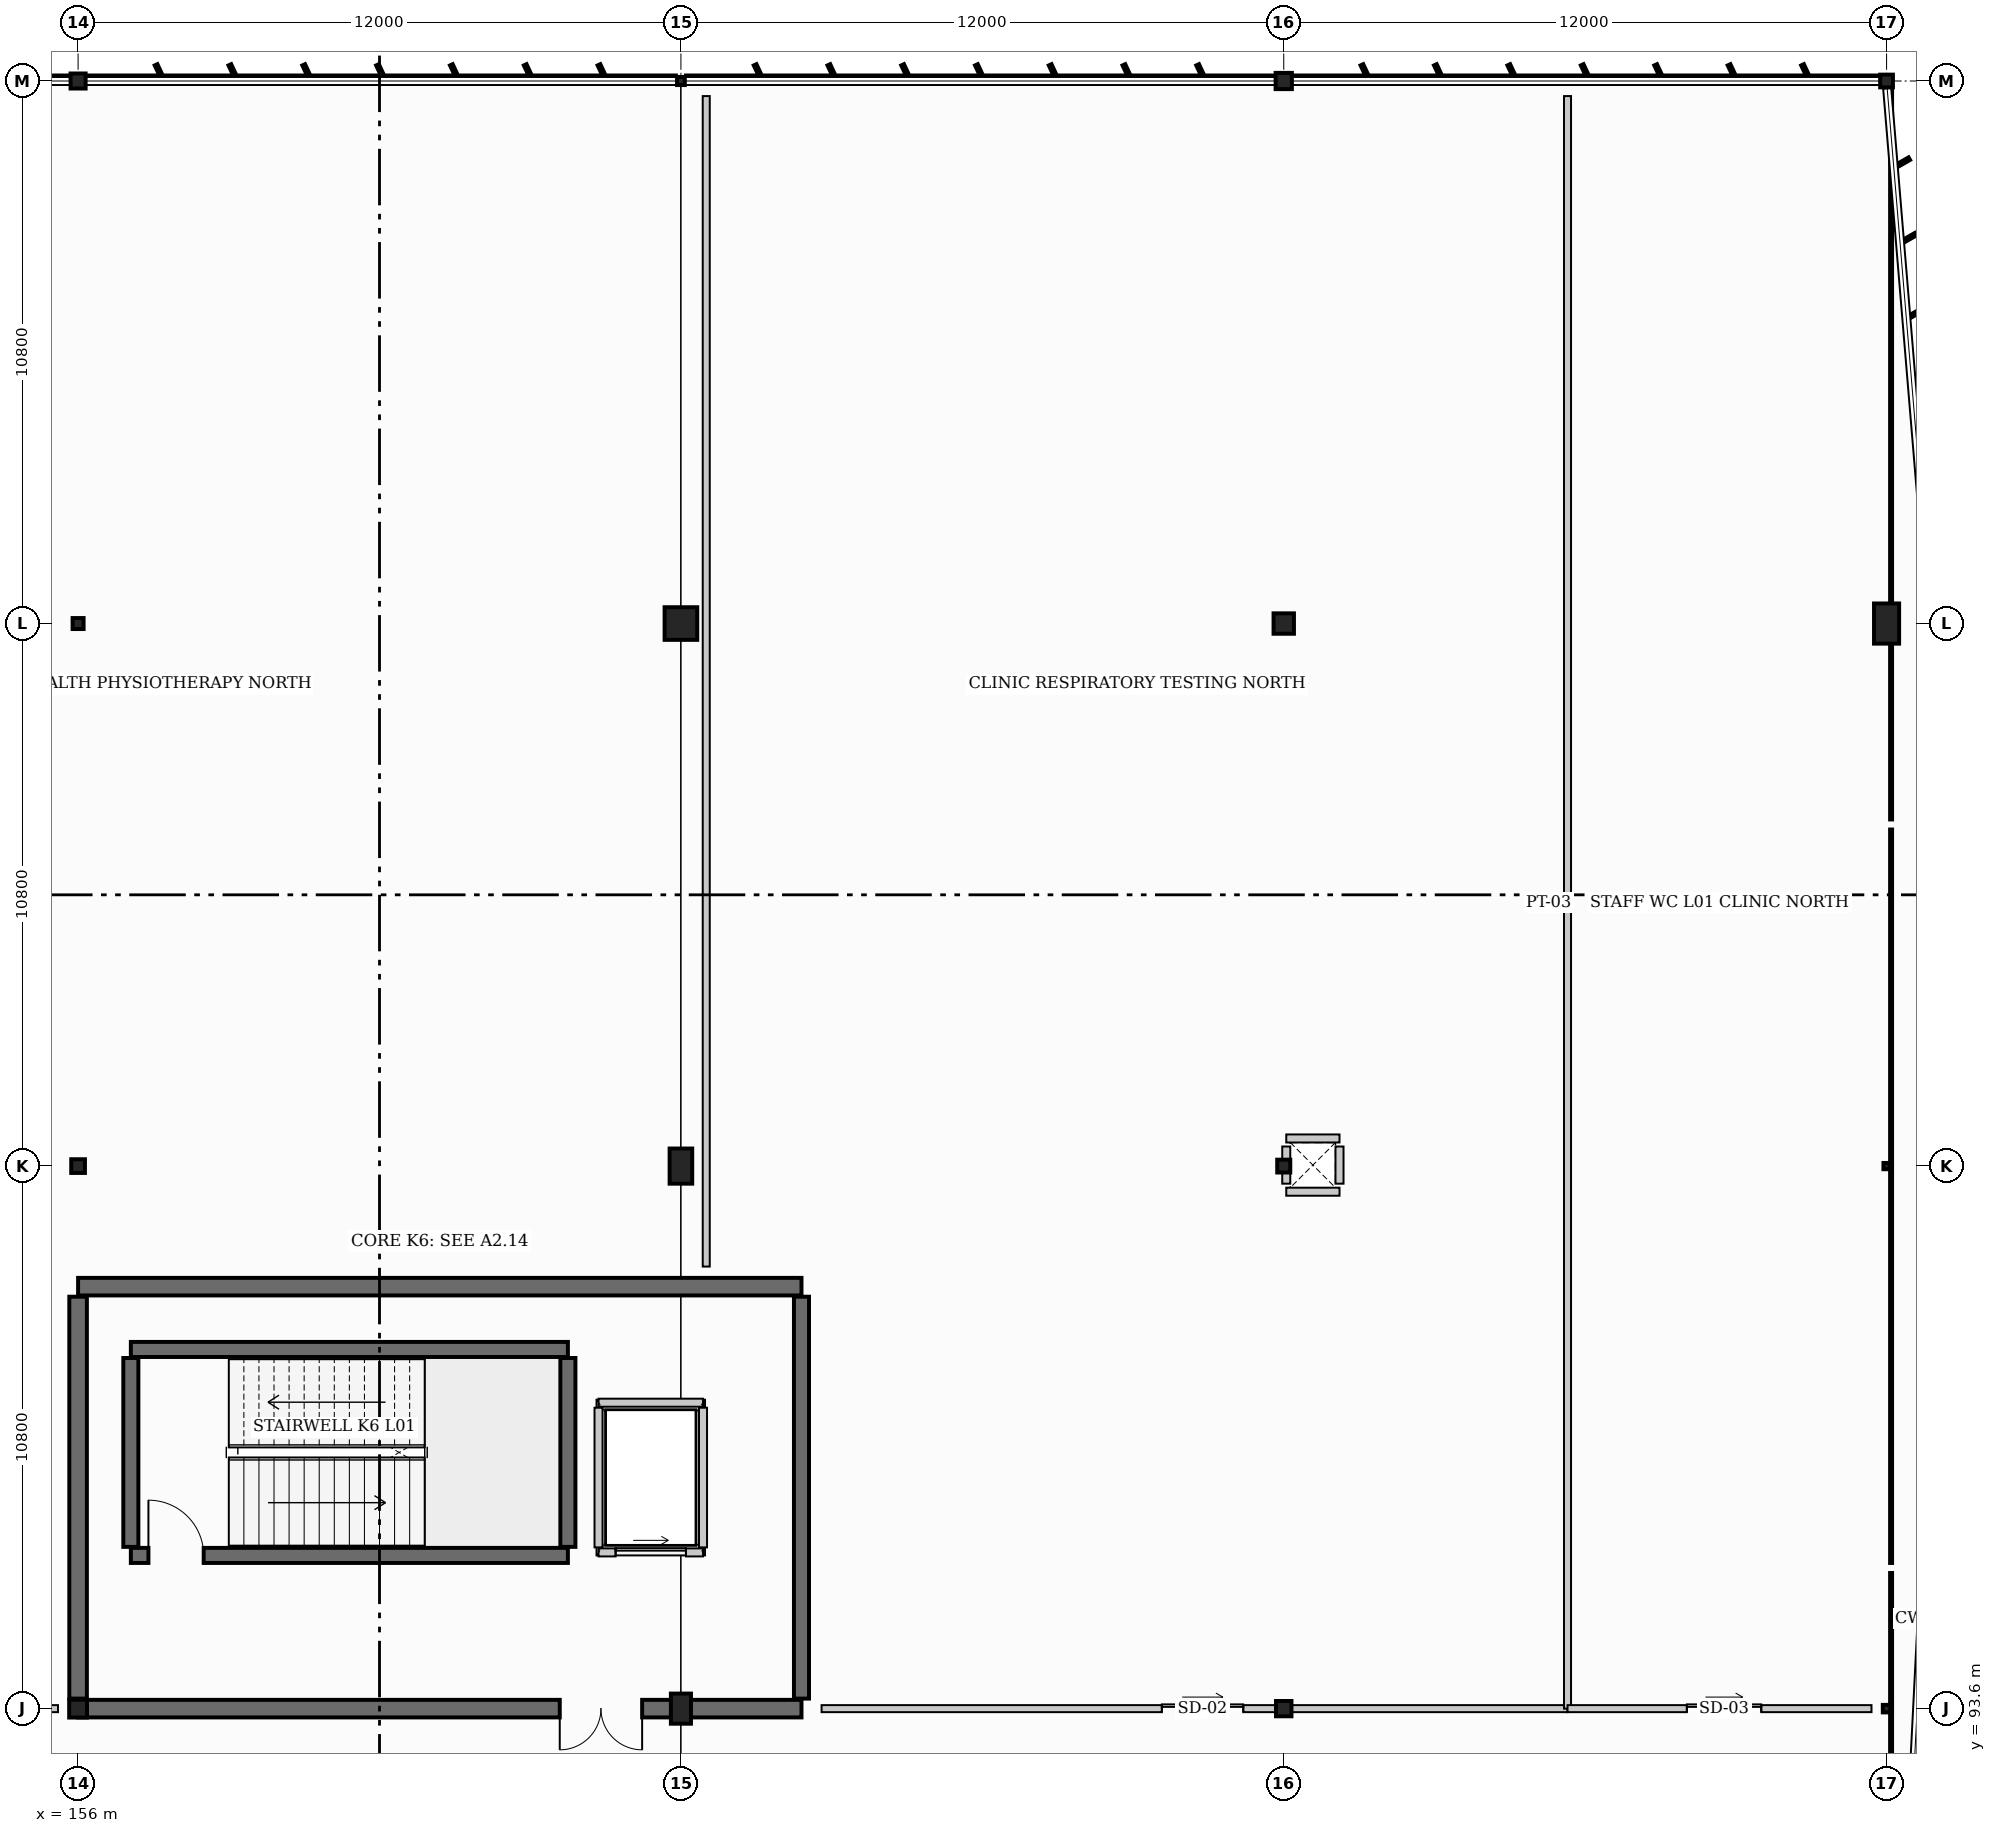
"""IFC4 building model, lengths in metres.
Left out: names, types, materials, properties, quantities, classifications, styles, units other than length and angle.
Written with IfcOpenShell. Run it as: python <this file> out.ifc"""

import sys

from ifc_helpers import new_model, si_unit, direction, frame, frame_2d, origin, origin_2d, place, context, subcontext, project, spatial, rectangle, hollow_rectangle, hollow_circle, i_section, extrude, element, fill, save


model = new_model("IFC4")
c1 = context("Model", 3, precision=1e-05, world=origin(), true_north=direction((0.0, 1.0)))
c2 = subcontext(c1, "Body", "Model", "MODEL_VIEW")
j1 = project(units=[si_unit("LENGTHUNIT", "METRE"), si_unit("PLANEANGLEUNIT", "RADIAN")], contexts=[c1])
p1 = place(None, origin())
s1 = spatial("IfcSite", under=j1, at=p1, CompositionType="ELEMENT")
p2 = place(p1, origin())
s2 = spatial("IfcBuilding", under=s1, at=p2, CompositionType="ELEMENT")
p3 = place(p2, frame((0.0, 0.0, 4.8)))
s3 = spatial("IfcBuildingStorey", under=s2, at=p3, CompositionType="ELEMENT", Elevation=4.8)
p4 = place(p3, frame((156.0, 93.6, 0.0), z_axis=(0.0, 0.0, 1.0), x_axis=(0.0, 1.0, 0.0)))
e1 = element("IfcColumn", 1, at=p4, inside=s3, PredefinedType="COLUMN", context=c2, shape_type="SweptSolid", body=[
    extrude(hollow_circle(Radius=0.178, WallThickness=0.013, at=origin_2d()), origin(), (0.0, 0.0, 1.0), 4.8),
])
p5 = place(p3, frame((156.0, 104.4, 0.0), z_axis=(0.0, 0.0, 1.0), x_axis=(0.0, 1.0, 0.0)))
e2 = element("IfcColumn", 2, at=p5, inside=s3, PredefinedType="COLUMN", context=c2, shape_type="SweptSolid", body=[
    extrude(hollow_circle(Radius=0.136, WallThickness=0.013, at=origin_2d()), origin(), (0.0, 0.0, 1.0), 4.8),
])
p6 = place(p3, frame((156.0, 115.2, 0.0), z_axis=(0.0, 0.0, 1.0), x_axis=(0.0, 1.0, 0.0)))
e3 = element("IfcColumn", 3, at=p6, inside=s3, PredefinedType="COLUMN", context=c2, shape_type="SweptSolid", body=[
    extrude(hollow_circle(Radius=0.11, WallThickness=0.01, at=origin_2d()), origin(), (0.0, 0.0, 1.0), 4.8),
])
p7 = place(p3, frame((156.0, 126.0, 0.0), z_axis=(0.0, 0.0, 1.0), x_axis=(0.0, 1.0, 0.0)))
e4 = element("IfcColumn", 4, at=p7, inside=s3, PredefinedType="COLUMN", context=c2, shape_type="SweptSolid", body=[
    extrude(hollow_rectangle(XDim=0.3, YDim=0.3, WallThickness=0.012, at=origin_2d()), origin(), (0.0, 0.0, 1.0), 4.8),
])
p8 = place(p3, frame((168.0, 93.6, 0.0), z_axis=(0.0, 0.0, 1.0), x_axis=(1.0, 0.0, 0.0)))
e5 = element("IfcColumn", 5, at=p8, inside=s3, PredefinedType="PILASTER", context=c2, shape_type="SweptSolid", body=[
    extrude(rectangle(XDim=0.4, YDim=0.6, at=origin_2d()), origin(), (0.0, 0.0, 1.0), 4.8),
])
p9 = place(p3, frame((168.0, 104.4, 0.0), z_axis=(0.0, 0.0, 1.0), x_axis=(1.0, 0.0, 0.0)))
e6 = element("IfcColumn", 6, at=p9, inside=s3, PredefinedType="PILASTER", context=c2, shape_type="SweptSolid", body=[
    extrude(rectangle(XDim=0.45, YDim=0.7, at=origin_2d()), origin(), (0.0, 0.0, 1.0), 4.8),
])
p10 = place(p3, frame((168.0, 115.2, 0.0), z_axis=(0.0, 0.0, 1.0), x_axis=(1.0, 0.0, 0.0)))
e7 = element("IfcColumn", 7, at=p10, inside=s3, PredefinedType="COLUMN", context=c2, shape_type="SweptSolid", body=[
    extrude(rectangle(XDim=0.65, YDim=0.65, at=origin_2d()), origin(), (0.0, 0.0, 1.0), 4.8),
])
p11 = place(p3, frame((168.0, 126.0, 0.0), z_axis=(0.0, 0.0, 1.0), x_axis=(1.0, 0.0, 0.0)))
e8 = element("IfcColumn", 8, at=p11, inside=s3, PredefinedType="COLUMN", context=c2, shape_type="SweptSolid", body=[
    extrude(i_section(OverallWidth=0.154, OverallDepth=0.162, WebThickness=0.008, FlangeThickness=0.011, at=origin_2d()), origin(), (0.0, 0.0, 1.0), 4.8),
])
p12 = place(p3, frame((180.0, 93.6, 0.0), z_axis=(0.0, 0.0, 1.0), x_axis=(0.0, 1.0, 0.0)))
e9 = element("IfcColumn", 9, at=p12, inside=s3, PredefinedType="COLUMN", context=c2, shape_type="SweptSolid", body=[
    extrude(i_section(OverallWidth=0.305, OverallDepth=0.308, WebThickness=0.01, FlangeThickness=0.015, at=origin_2d()), origin(), (0.0, 0.0, 1.0), 4.8),
])
p13 = place(p3, frame((180.0, 104.4, 0.0), z_axis=(0.0, 0.0, 1.0), x_axis=(0.0, 1.0, 0.0)))
e10 = element("IfcColumn", 10, at=p13, inside=s3, PredefinedType="COLUMN", context=c2, shape_type="SweptSolid", body=[
    extrude(i_section(OverallWidth=0.256, OverallDepth=0.26, WebThickness=0.01, FlangeThickness=0.017, at=origin_2d()), origin(), (0.0, 0.0, 1.0), 4.8),
])
p14 = place(p3, frame((180.0, 115.2, 0.0), z_axis=(0.0, 0.0, 1.0), x_axis=(0.0, 1.0, 0.0)))
e11 = element("IfcColumn", 11, at=p14, inside=s3, PredefinedType="COLUMN", context=c2, shape_type="SweptSolid", body=[
    extrude(hollow_circle(Radius=0.203, WallThickness=0.016, at=origin_2d()), origin(), (0.0, 0.0, 1.0), 4.8),
])
p15 = place(p3, frame((180.0, 126.0, 0.0), z_axis=(0.0, 0.0, 1.0), x_axis=(0.0, 1.0, 0.0)))
e12 = element("IfcColumn", 12, at=p15, inside=s3, PredefinedType="COLUMN", context=c2, shape_type="SweptSolid", body=[
    extrude(hollow_circle(Radius=0.162, WallThickness=0.013, at=origin_2d()), origin(), (0.0, 0.0, 1.0), 4.8),
])
p16 = place(p3, frame((192.0, 93.6, 0.0), z_axis=(0.0, 0.0, 1.0), x_axis=(1.0, 0.0, 0.0)))
e13 = element("IfcColumn", 13, at=p16, inside=s3, PredefinedType="COLUMN", context=c2, shape_type="SweptSolid", body=[
    extrude(hollow_rectangle(XDim=0.15, YDim=0.15, WallThickness=0.008, at=origin_2d()), origin(), (0.0, 0.0, 1.0), 4.8),
])
p17 = place(p3, frame((192.0, 104.4, 0.0), z_axis=(0.0, 0.0, 1.0), x_axis=(1.0, 0.0, 0.0)))
e14 = element("IfcColumn", 14, at=p17, inside=s3, PredefinedType="COLUMN", context=c2, shape_type="SweptSolid", body=[
    extrude(hollow_rectangle(XDim=0.125, YDim=0.125, WallThickness=0.006, at=origin_2d()), origin(), (0.0, 0.0, 1.0), 4.8),
])
p18 = place(p3, frame((192.0, 115.2, 0.0), z_axis=(0.0, 0.0, 1.0), x_axis=(1.0, 0.0, 0.0)))
e15 = element("IfcColumn", 15, at=p18, inside=s3, PredefinedType="PILASTER", context=c2, shape_type="SweptSolid", body=[
    extrude(rectangle(XDim=0.5, YDim=0.8, at=origin_2d()), origin(), (0.0, 0.0, 1.0), 4.8),
])
p19 = place(p3, frame((192.0, 126.0, 0.0), z_axis=(0.0, 0.0, 1.0), x_axis=(1.0, 0.0, 0.0)))
e16 = element("IfcColumn", 16, at=p19, inside=s3, PredefinedType="COLUMN", context=c2, shape_type="SweptSolid", body=[
    extrude(i_section(OverallWidth=0.254, OverallDepth=0.254, WebThickness=0.009, FlangeThickness=0.014, at=origin_2d()), origin(), (0.0, 0.0, 1.0), 4.8),
])
p20 = place(p3, frame((156.0, 102.0, 0.0), z_axis=(0.0, 0.0, 1.0), x_axis=(1.0, 0.0, 0.0)))
e17 = element("IfcWall", 17, at=p20, inside=s3, PredefinedType="SHEAR", context=c2, shape_type="SweptSolid", body=[
    extrude(rectangle(XDim=14.4, YDim=0.35, at=frame_2d((7.2, 0.0))), origin(), (0.0, 0.0, 1.0), 4.8),
])
p21 = place(p3, frame((170.4, 93.6, 0.0), z_axis=(0.0, 0.0, 1.0), x_axis=(-1.0, 0.0, 0.0)))
e18 = element("IfcWall", 18, at=p21, inside=s3, PredefinedType="SHEAR", context=c2, shape_type="SweptSolid", body=[
    extrude(rectangle(XDim=14.4, YDim=0.35, at=frame_2d((7.2, 0.0))), origin(), (0.0, 0.0, 1.0), 4.8),
])
p22 = place(p21, frame((3.172, 0.0, 0.0)))
e19 = element("IfcOpeningElement", 19, at=p22, cuts=e18, PredefinedType="OPENING", context=c2, shape_type="SweptSolid", body=[
    extrude(rectangle(XDim=1.64, YDim=2.2, at=frame_2d((0.82, 1.1))), frame((0.0, 0.185, 0.0), z_axis=(0.0, -1.0, 0.0), x_axis=(1.0, 0.0, 0.0)), (0.0, 0.0, 1.0), 0.37),
])
p23 = place(p3, frame((156.0, 93.8, 0.0), z_axis=(0.0, 0.0, 1.0), x_axis=(0.0, 1.0, 0.0)))
e20 = element("IfcWall", 20, at=p23, inside=s3, PredefinedType="SHEAR", context=c2, shape_type="SweptSolid", body=[
    extrude(rectangle(XDim=8.0, YDim=0.35, at=frame_2d((4.0, 0.0))), origin(), (0.0, 0.0, 1.0), 4.8),
])
p24 = place(p3, frame((170.4, 101.8, 0.0), z_axis=(0.0, 0.0, 1.0), x_axis=(0.0, -1.0, 0.0)))
e21 = element("IfcWall", 21, at=p24, inside=s3, PredefinedType="SHEAR", context=c2, shape_type="SweptSolid", body=[
    extrude(rectangle(XDim=8.0, YDim=0.3, at=frame_2d((4.0, 0.0))), origin(), (0.0, 0.0, 1.0), 4.8),
])
p25 = place(p3, frame((157.05, 96.65, 0.0), z_axis=(0.0, 0.0, 1.0), x_axis=(1.0, 0.0, 0.0)))
e22 = element("IfcWall", 22, at=p25, inside=s3, PredefinedType="SHEAR", context=c2, shape_type="SweptSolid", body=[
    extrude(rectangle(XDim=8.7, YDim=0.3, at=frame_2d((4.35, 0.0))), origin(), (0.0, 0.0, 1.0), 4.8),
])
p26 = place(p25, frame((0.35, 0.0, 0.0)))
e23 = element("IfcOpeningElement", 23, at=p26, cuts=e22, PredefinedType="OPENING", context=c2, shape_type="SweptSolid", body=[
    extrude(rectangle(XDim=1.1, YDim=2.15, at=frame_2d((0.55, 1.075))), frame((0.0, 0.16, 0.0), z_axis=(0.0, -1.0, 0.0), x_axis=(1.0, 0.0, 0.0)), (0.0, 0.0, 1.0), 0.32),
])
p27 = place(p3, frame((165.75, 100.75, 0.0), z_axis=(0.0, 0.0, 1.0), x_axis=(-1.0, 0.0, 0.0)))
e24 = element("IfcWall", 24, at=p27, inside=s3, PredefinedType="SHEAR", context=c2, shape_type="SweptSolid", body=[
    extrude(rectangle(XDim=8.7, YDim=0.3, at=frame_2d((4.35, 0.0))), origin(), (0.0, 0.0, 1.0), 4.8),
])
for number, where, z_axis, x_axis in (
    (25, (157.05, 96.82, 0.0), (0.0, 0.0, 1.0), (0.0, 1.0, 0.0)),
    (26, (165.75, 96.82, 0.0), (0.0, 0.0, 1.0), (0.0, 1.0, 0.0)),
):
    element("IfcWall", number, at=place(p3, frame(where, z_axis=z_axis, x_axis=x_axis)), inside=s3, PredefinedType="SHEAR", context=c2, shape_type="SweptSolid", body=[
        extrude(rectangle(XDim=3.76, YDim=0.3, at=frame_2d((1.88, 0.0))), origin(), (0.0, 0.0, 1.0), 4.8),
    ])
for number, where, z_axis, x_axis in (
    (27, (180.05, 103.89, 0.0), (0.0, 0.0, 1.0), (1.0, 0.0, 0.0)),
    (28, (181.11, 104.95, 0.0), (0.0, 0.0, 1.0), (-1.0, 0.0, 0.0)),
):
    element("IfcWall", number, at=place(p3, frame(where, z_axis=z_axis, x_axis=x_axis)), inside=s3, PredefinedType="PARTITIONING", context=c2, shape_type="SweptSolid", body=[
        extrude(rectangle(XDim=1.06, YDim=0.16, at=frame_2d((0.53, 0.0))), origin(), (0.0, 0.0, 1.0), 3.55),
    ])
for number, where, z_axis, x_axis in (
    (29, (180.05, 104.79, 0.0), (0.0, 0.0, 1.0), (0.0, -1.0, 0.0)),
    (30, (181.11, 104.05, 0.0), (0.0, 0.0, 1.0), (0.0, 1.0, 0.0)),
):
    element("IfcWall", number, at=place(p3, frame(where, z_axis=z_axis, x_axis=x_axis)), inside=s3, PredefinedType="PARTITIONING", context=c2, shape_type="SweptSolid", body=[
        extrude(rectangle(XDim=0.74, YDim=0.16, at=frame_2d((0.37, 0.0))), origin(), (0.0, 0.0, 1.0), 3.55),
    ])
p28 = place(p3, frame((166.36, 96.71, 0.0), z_axis=(0.0, 0.0, 1.0), x_axis=(1.0, 0.0, 0.0)))
e31 = element("IfcWall", 31, at=p28, inside=s3, PredefinedType="PARTITIONING", context=c2, shape_type="SweptSolid", body=[
    extrude(rectangle(XDim=2.08, YDim=0.16, at=frame_2d((1.04, 0.0))), origin(), (0.0, 0.0, 1.0), 4.43),
])
p29 = place(p28, frame((0.34, 0.0, 0.0)))
e32 = element("IfcOpeningElement", 32, at=p29, cuts=e31, PredefinedType="OPENING", context=c2, shape_type="SweptSolid", body=[
    extrude(rectangle(XDim=1.4, YDim=2.2, at=frame_2d((0.7, 1.1))), frame((0.0, 0.09, 0.0), z_axis=(0.0, -1.0, 0.0), x_axis=(1.0, 0.0, 0.0)), (0.0, 0.0, 1.0), 0.18),
])
p30 = place(p3, frame((168.44, 99.69, 0.0), z_axis=(0.0, 0.0, 1.0), x_axis=(-1.0, 0.0, 0.0)))
e33 = element("IfcWall", 33, at=p30, inside=s3, PredefinedType="PARTITIONING", context=c2, shape_type="SweptSolid", body=[
    extrude(rectangle(XDim=2.08, YDim=0.16, at=frame_2d((1.04, 0.0))), origin(), (0.0, 0.0, 1.0), 4.43),
])
for number, where, z_axis, x_axis in (
    (34, (166.36, 99.59, 0.0), (0.0, 0.0, 1.0), (0.0, -1.0, 0.0)),
    (35, (168.44, 96.81, 0.0), (0.0, 0.0, 1.0), (0.0, 1.0, 0.0)),
):
    element("IfcWall", number, at=place(p3, frame(where, z_axis=z_axis, x_axis=x_axis)), inside=s3, PredefinedType="PARTITIONING", context=c2, shape_type="SweptSolid", body=[
        extrude(rectangle(XDim=2.78, YDim=0.16, at=frame_2d((1.39, 0.0))), origin(), (0.0, 0.0, 1.0), 4.43),
    ])
p31 = place(p3, frame((144.3, 93.6, 0.0), z_axis=(0.0, 0.0, 1.0), x_axis=(1.0, 0.0, 0.0)))
e36 = element("IfcWall", 36, at=p31, inside=s3, PredefinedType="PARTITIONING", context=c2, shape_type="SweptSolid", body=[
    extrude(rectangle(XDim=11.3, YDim=0.14, at=frame_2d((5.65, 0.0))), origin(), (0.0, 0.0, 1.0), 3.897),
])
p32 = place(p31, frame((5.0, 0.0, 0.0)))
e37 = element("IfcOpeningElement", 37, at=p32, cuts=e36, PredefinedType="OPENING", context=c2, shape_type="SweptSolid", body=[
    extrude(rectangle(XDim=0.92, YDim=2.04, at=frame_2d((0.46, 1.02))), frame((0.0, 0.08, 0.0), z_axis=(0.0, -1.0, 0.0), x_axis=(1.0, 0.0, 0.0)), (0.0, 0.0, 1.0), 0.16),
])
p33 = place(p3, frame((168.504, 102.4, 0.0), z_axis=(0.0, 0.0, 1.0), x_axis=(0.0, 1.0, 0.0)))
e38 = element("IfcWall", 38, at=p33, inside=s3, PredefinedType="PARTITIONING", context=c2, shape_type="SweptSolid", body=[
    extrude(rectangle(XDim=23.3, YDim=0.14, at=frame_2d((11.65, 0.0))), origin(), (0.0, 0.0, 1.0), 3.48),
])
p34 = place(p3, frame((170.8, 93.6, 0.0), z_axis=(0.0, 0.0, 1.0), x_axis=(1.0, 0.0, 0.0)))
e39 = element("IfcWall", 39, at=p34, inside=s3, PredefinedType="PARTITIONING", context=c2, shape_type="SweptSolid", body=[
    extrude(rectangle(XDim=14.849, YDim=0.14, at=frame_2d((7.424, 0.0))), origin(), (0.0, 0.0, 1.0), 3.53),
])
p35 = place(p34, frame((6.774, 0.0, 0.0)))
e40 = element("IfcOpeningElement", 40, at=p35, cuts=e39, PredefinedType="OPENING", context=c2, shape_type="SweptSolid", body=[
    extrude(rectangle(XDim=1.62, YDim=2.3, at=frame_2d((0.81, 1.15))), frame((0.0, 0.08, 0.0), z_axis=(0.0, -1.0, 0.0), x_axis=(1.0, 0.0, 0.0)), (0.0, 0.0, 1.0), 0.16),
])
p36 = place(p3, frame((185.649, 93.6, 0.0), z_axis=(0.0, 0.0, 1.0), x_axis=(0.0, 1.0, 0.0)))
e41 = element("IfcWall", 41, at=p36, inside=s3, PredefinedType="PARTITIONING", context=c2, shape_type="SweptSolid", body=[
    extrude(rectangle(XDim=32.1, YDim=0.14, at=frame_2d((16.05, 0.0))), origin(), (0.0, 0.0, 1.0), 3.48),
])
p37 = place(p3, frame((185.649, 93.6, 0.0), z_axis=(0.0, 0.0, 1.0), x_axis=(1.0, 0.0, 0.0)))
e42 = element("IfcWall", 42, at=p37, inside=s3, PredefinedType="PARTITIONING", context=c2, shape_type="SweptSolid", body=[
    extrude(rectangle(XDim=6.051, YDim=0.14, at=frame_2d((3.025, 0.0))), origin(), (0.0, 0.0, 1.0), 3.976),
])
p38 = place(p37, frame((2.376, 0.0, 0.0)))
e43 = element("IfcOpeningElement", 43, at=p38, cuts=e42, PredefinedType="OPENING", context=c2, shape_type="SweptSolid", body=[
    extrude(rectangle(XDim=1.48, YDim=2.26, at=frame_2d((0.74, 1.13))), frame((0.0, 0.08, 0.0), z_axis=(0.0, -1.0, 0.0), x_axis=(1.0, 0.0, 0.0)), (0.0, 0.0, 1.0), 0.16),
])
p39 = place(p29, origin())
e44 = element("IfcDoor", 44, at=p39, inside=s3, OperationType="SLIDING_TO_RIGHT", PredefinedType="DOOR", context=c2, shape_type="SweptSolid", body=[
    extrude(rectangle(XDim=1.4, YDim=2.2, at=frame_2d((0.7, 1.1))), frame((0.0, 0.025, 0.0), z_axis=(0.0, -1.0, 0.0), x_axis=(1.0, 0.0, 0.0)), (0.0, 0.0, 1.0), 0.05),
])
fill(e32, e44)
p40 = place(p26, origin())
e45 = element("IfcDoor", 45, at=p40, inside=s3, OperationType="SINGLE_SWING_LEFT", PredefinedType="DOOR", context=c2, shape_type="SweptSolid", body=[
    extrude(rectangle(XDim=1.1, YDim=2.15, at=frame_2d((0.55, 1.075))), frame((0.0, 0.025, 0.0), z_axis=(0.0, -1.0, 0.0), x_axis=(1.0, 0.0, 0.0)), (0.0, 0.0, 1.0), 0.05),
])
fill(e23, e45)
p41 = place(p22, origin())
e46 = element("IfcDoor", 46, at=p41, inside=s3, OperationType="DOUBLE_DOOR_SINGLE_SWING", PredefinedType="DOOR", context=c2, shape_type="SweptSolid", body=[
    extrude(rectangle(XDim=1.64, YDim=2.2, at=frame_2d((0.82, 1.1))), frame((0.0, 0.025, 0.0), z_axis=(0.0, -1.0, 0.0), x_axis=(1.0, 0.0, 0.0)), (0.0, 0.0, 1.0), 0.05),
])
fill(e19, e46)
p42 = place(p35, origin())
e47 = element("IfcDoor", 47, at=p42, inside=s3, OperationType="SLIDING_TO_RIGHT", PredefinedType="DOOR", context=c2, shape_type="SweptSolid", body=[
    extrude(rectangle(XDim=1.62, YDim=2.3, at=frame_2d((0.81, 1.15))), frame((0.0, 0.025, 0.0), z_axis=(0.0, -1.0, 0.0), x_axis=(1.0, 0.0, 0.0)), (0.0, 0.0, 1.0), 0.05),
])
fill(e40, e47)
p43 = place(p38, origin())
e48 = element("IfcDoor", 48, at=p43, inside=s3, OperationType="SLIDING_TO_LEFT", PredefinedType="DOOR", context=c2, shape_type="SweptSolid", body=[
    extrude(rectangle(XDim=1.48, YDim=2.26, at=frame_2d((0.74, 1.13))), frame((0.0, 0.025, 0.0), z_axis=(0.0, -1.0, 0.0), x_axis=(1.0, 0.0, 0.0)), (0.0, 0.0, 1.0), 0.05),
])
fill(e43, e48)
save(model, sys.argv[1])
